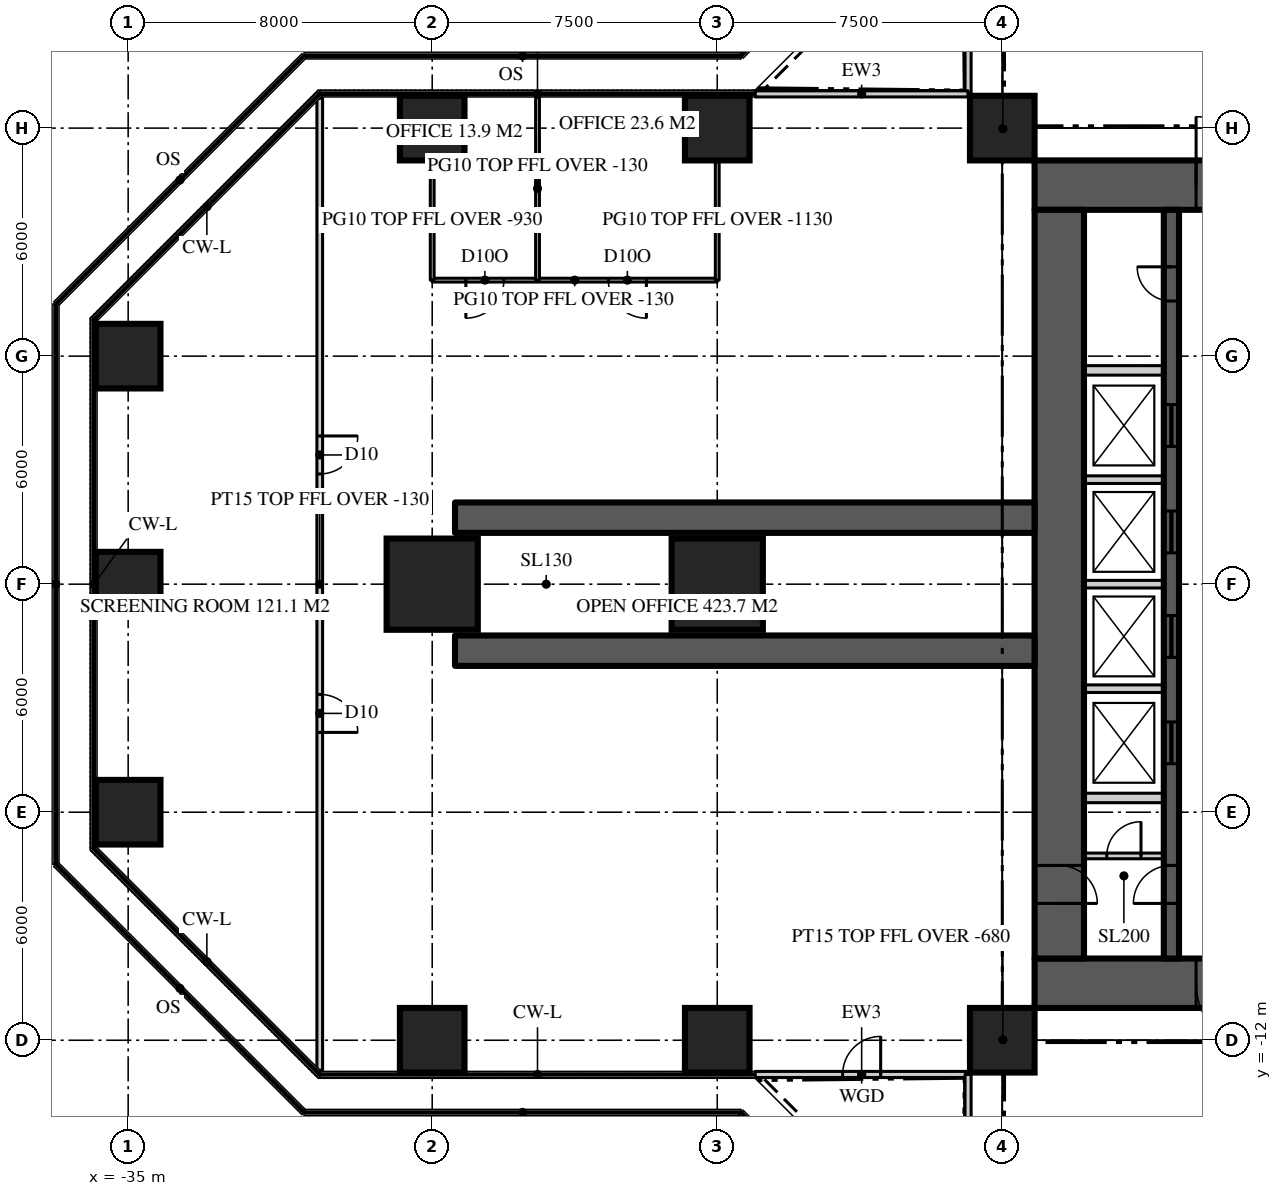
"""IFC4 building model, lengths in metres.
Left out: names, types, materials, properties, quantities, classifications, styles, units other than length and angle.
Written with IfcOpenShell. Run it as: python <this file> out.ifc"""

import sys

from ifc_helpers import new_model, si_unit, direction, frame, frame_2d, origin, origin_2d, place, context, subcontext, project, spatial, rectangle, extrude, element, fill, save


model = new_model("IFC4")
c1 = context("Model", 3, precision=1e-05, world=origin(), true_north=direction((0.0, 1.0)))
c2 = subcontext(c1, "Body", "Model", "MODEL_VIEW")
j1 = project(units=[si_unit("LENGTHUNIT", "METRE"), si_unit("PLANEANGLEUNIT", "RADIAN")], contexts=[c1])
p1 = place(None, origin())
s1 = spatial("IfcSite", under=j1, at=p1, CompositionType="ELEMENT")
p2 = place(p1, origin())
s2 = spatial("IfcBuilding", under=s1, at=p2, CompositionType="ELEMENT")
p3 = place(p2, frame((0.0, 0.0, 82.5)))
s3 = spatial("IfcBuildingStorey", under=s2, at=p3, CompositionType="ELEMENT", Elevation=82.5)
p4 = place(p3, frame((-11.15, 10.5, 0.0), z_axis=(0.0, 0.0, 1.0), x_axis=(1.0, 0.0, 0.0)))
e1 = element("IfcWall", 1, at=p4, inside=s3, PredefinedType="SHEAR", context=c2, shape_type="SweptSolid", body=[
    extrude(rectangle(XDim=22.3, YDim=1.3, at=frame_2d((11.15, 0.0))), origin(), (0.0, 0.0, 1.0), 3.9),
])
p5 = place(p4, frame((4.25, 0.0, 0.0)))
e2 = element("IfcOpeningElement", 2, at=p5, cuts=e1, PredefinedType="OPENING", context=c2, shape_type="SweptSolid", body=[
    extrude(rectangle(XDim=1.8, YDim=2.2, at=frame_2d((0.9, 1.1))), frame((0.0, 0.66, 0.0), z_axis=(0.0, -1.0, 0.0), x_axis=(1.0, 0.0, 0.0)), (0.0, 0.0, 1.0), 1.32),
])
p6 = place(p4, frame((16.25, 0.0, 0.0)))
e3 = element("IfcOpeningElement", 3, at=p6, cuts=e1, PredefinedType="OPENING", context=c2, shape_type="SweptSolid", body=[
    extrude(rectangle(XDim=1.8, YDim=2.2, at=frame_2d((0.9, 1.1))), frame((0.0, 0.66, 0.0), z_axis=(0.0, -1.0, 0.0), x_axis=(1.0, 0.0, 0.0)), (0.0, 0.0, 1.0), 1.32),
])
p7 = place(p3, frame((11.15, -10.5, 0.0), z_axis=(0.0, 0.0, 1.0), x_axis=(-1.0, 0.0, 0.0)))
e4 = element("IfcWall", 4, at=p7, inside=s3, PredefinedType="SHEAR", context=c2, shape_type="SweptSolid", body=[
    extrude(rectangle(XDim=22.3, YDim=1.3, at=frame_2d((11.15, 0.0))), origin(), (0.0, 0.0, 1.0), 3.9),
])
p8 = place(p7, frame((16.25, 0.0, 0.0)))
e5 = element("IfcOpeningElement", 5, at=p8, cuts=e4, PredefinedType="OPENING", context=c2, shape_type="SweptSolid", body=[
    extrude(rectangle(XDim=1.8, YDim=2.2, at=frame_2d((0.9, 1.1))), frame((0.0, 0.66, 0.0), z_axis=(0.0, -1.0, 0.0), x_axis=(1.0, 0.0, 0.0)), (0.0, 0.0, 1.0), 1.32),
])
p9 = place(p7, frame((4.25, 0.0, 0.0)))
e6 = element("IfcOpeningElement", 6, at=p9, cuts=e4, PredefinedType="OPENING", context=c2, shape_type="SweptSolid", body=[
    extrude(rectangle(XDim=1.8, YDim=2.2, at=frame_2d((0.9, 1.1))), frame((0.0, 0.66, 0.0), z_axis=(0.0, -1.0, 0.0), x_axis=(1.0, 0.0, 0.0)), (0.0, 0.0, 1.0), 1.32),
])
p10 = place(p3, frame((-10.5, 9.85, 0.0), z_axis=(0.0, 0.0, 1.0), x_axis=(0.0, -1.0, 0.0)))
e7 = element("IfcWall", 7, at=p10, inside=s3, PredefinedType="SHEAR", context=c2, shape_type="SweptSolid", body=[
    extrude(rectangle(XDim=19.7, YDim=1.3, at=frame_2d((9.85, 0.0))), origin(), (0.0, 0.0, 1.0), 3.9),
])
p11 = place(p10, frame((17.25, 0.0, 0.0)))
e8 = element("IfcOpeningElement", 8, at=p11, cuts=e7, PredefinedType="OPENING", context=c2, shape_type="SweptSolid", body=[
    extrude(rectangle(XDim=1.0, YDim=2.2, at=frame_2d((0.5, 1.1))), frame((0.0, 0.66, 0.0), z_axis=(0.0, -1.0, 0.0), x_axis=(1.0, 0.0, 0.0)), (0.0, 0.0, 1.0), 1.32),
])
for number, where, z_axis, x_axis in (
    (9, (-11.15, 1.75, 0.0), (0.0, 0.0, 1.0), (-1.0, 0.0, 0.0)),
    (10, (-11.15, -1.75, 0.0), (0.0, 0.0, 1.0), (-1.0, 0.0, 0.0)),
):
    element("IfcWall", number, at=place(p3, frame(where, z_axis=z_axis, x_axis=x_axis)), inside=s3, PredefinedType="SHEAR", context=c2, shape_type="SweptSolid", body=[
        extrude(rectangle(XDim=15.25, YDim=0.8, at=frame_2d((7.625, 0.0))), origin(), (0.0, 0.0, 1.0), 3.9),
    ])
for number, where, z_axis, x_axis in (
    (11, (-27.0, -12.0, 0.0), (0.0, 0.0, 1.0), (1.0, 0.0, 0.0)),
    (12, (-19.5, -12.0, 0.0), (0.0, 0.0, 1.0), (1.0, 0.0, 0.0)),
    (13, (-12.0, -12.0, 0.0), (0.0, 0.0, 1.0), (1.0, 0.0, 0.0)),
    (14, (-35.0, -6.0, 0.0), (0.0, 0.0, 1.0), (1.0, 0.0, 0.0)),
    (15, (-35.0, 0.0, 0.0), (0.0, 0.0, 1.0), (1.0, 0.0, 0.0)),
):
    element("IfcColumn", number, at=place(p3, frame(where, z_axis=z_axis, x_axis=x_axis)), inside=s3, PredefinedType="COLUMN", context=c2, shape_type="SweptSolid", body=[
        extrude(rectangle(XDim=1.7, YDim=1.7, at=origin_2d()), origin(), (0.0, 0.0, 1.0), 3.9),
    ])
for number, where, z_axis, x_axis in (
    (16, (-27.0, 0.0, 0.0), (0.0, 0.0, 1.0), (1.0, 0.0, 0.0)),
    (17, (-19.5, 0.0, 0.0), (0.0, 0.0, 1.0), (1.0, 0.0, 0.0)),
):
    element("IfcColumn", number, at=place(p3, frame(where, z_axis=z_axis, x_axis=x_axis)), inside=s3, PredefinedType="COLUMN", context=c2, shape_type="SweptSolid", body=[
        extrude(rectangle(XDim=2.4, YDim=2.4, at=origin_2d()), origin(), (0.0, 0.0, 1.0), 3.9),
    ])
for number, where, z_axis, x_axis in (
    (18, (-35.0, 6.0, 0.0), (0.0, 0.0, 1.0), (1.0, 0.0, 0.0)),
    (19, (-27.0, 12.0, 0.0), (0.0, 0.0, 1.0), (1.0, 0.0, 0.0)),
    (20, (-19.5, 12.0, 0.0), (0.0, 0.0, 1.0), (1.0, 0.0, 0.0)),
    (21, (-12.0, 12.0, 0.0), (0.0, 0.0, 1.0), (1.0, 0.0, 0.0)),
):
    element("IfcColumn", number, at=place(p3, frame(where, z_axis=z_axis, x_axis=x_axis)), inside=s3, PredefinedType="COLUMN", context=c2, shape_type="SweptSolid", body=[
        extrude(rectangle(XDim=1.7, YDim=1.7, at=origin_2d()), origin(), (0.0, 0.0, 1.0), 3.9),
    ])
p12 = place(p3, frame((-12.9, 18.5, 0.0), z_axis=(0.0, 0.0, 1.0), x_axis=(0.0, -1.0, 0.0)))
e22 = element("IfcWall", 22, at=p12, inside=s3, PredefinedType="SOLIDWALL", context=c2, shape_type="SweptSolid", body=[
    extrude(rectangle(XDim=5.6, YDim=0.16, at=frame_2d((2.8, 0.0))), origin(), (0.0, 0.0, 1.0), 3.77),
])
p13 = place(p12, frame((2.3, 0.0, 0.0)))
e23 = element("IfcOpeningElement", 23, at=p13, cuts=e22, PredefinedType="OPENING", context=c2, shape_type="SweptSolid", body=[
    extrude(rectangle(XDim=1.0, YDim=2.2, at=frame_2d((0.5, 1.1))), frame((0.0, 0.09, 0.0), z_axis=(0.0, -1.0, 0.0), x_axis=(1.0, 0.0, 0.0)), (0.0, 0.0, 1.0), 0.18),
])
p14 = place(p3, frame((-12.9, 12.9, 0.0), z_axis=(0.0, 0.0, 1.0), x_axis=(-1.0, 0.0, 0.0)))
e24 = element("IfcWall", 24, at=p14, inside=s3, PredefinedType="SOLIDWALL", context=c2, shape_type="SweptSolid", body=[
    extrude(rectangle(XDim=5.6, YDim=0.16, at=frame_2d((2.8, 0.0))), origin(), (0.0, 0.0, 1.0), 3.77),
])
p15 = place(p3, frame((-18.5, -12.9, 0.0), z_axis=(0.0, 0.0, 1.0), x_axis=(1.0, 0.0, 0.0)))
e25 = element("IfcWall", 25, at=p15, inside=s3, PredefinedType="SOLIDWALL", context=c2, shape_type="SweptSolid", body=[
    extrude(rectangle(XDim=5.6, YDim=0.16, at=frame_2d((2.8, 0.0))), origin(), (0.0, 0.0, 1.0), 3.77),
])
p16 = place(p15, frame((2.3, 0.0, 0.0)))
e26 = element("IfcOpeningElement", 26, at=p16, cuts=e25, PredefinedType="OPENING", context=c2, shape_type="SweptSolid", body=[
    extrude(rectangle(XDim=1.0, YDim=2.2, at=frame_2d((0.5, 1.1))), frame((0.0, 0.09, 0.0), z_axis=(0.0, -1.0, 0.0), x_axis=(1.0, 0.0, 0.0)), (0.0, 0.0, 1.0), 0.18),
])
p17 = place(p3, frame((-12.9, -12.9, 0.0), z_axis=(0.0, 0.0, 1.0), x_axis=(0.0, -1.0, 0.0)))
e27 = element("IfcWall", 27, at=p17, inside=s3, PredefinedType="SOLIDWALL", context=c2, shape_type="SweptSolid", body=[
    extrude(rectangle(XDim=5.6, YDim=0.16, at=frame_2d((2.8, 0.0))), origin(), (0.0, 0.0, 1.0), 3.77),
])
p18 = place(p3, frame((-7.55, -9.85, 0.0), z_axis=(0.0, 0.0, 1.0), x_axis=(0.0, 1.0, 0.0)))
e28 = element("IfcWall", 28, at=p18, inside=s3, PredefinedType="SHEAR", context=c2, shape_type="SweptSolid", body=[
    extrude(rectangle(XDim=19.7, YDim=0.4, at=frame_2d((9.85, 0.0))), origin(), (0.0, 0.0, 1.0), 3.9),
])
p19 = place(p18, frame((1.45, 0.0, 0.0)))
e29 = element("IfcOpeningElement", 29, at=p19, cuts=e28, PredefinedType="OPENING", context=c2, shape_type="SweptSolid", body=[
    extrude(rectangle(XDim=1.0, YDim=2.2, at=frame_2d((0.5, 1.1))), frame((0.0, 0.21, 0.0), z_axis=(0.0, -1.0, 0.0), x_axis=(1.0, 0.0, 0.0)), (0.0, 0.0, 1.0), 0.42),
])
p20 = place(p18, frame((17.3, 0.0, 0.0)))
e30 = element("IfcOpeningElement", 30, at=p20, cuts=e28, PredefinedType="OPENING", context=c2, shape_type="SweptSolid", body=[
    extrude(rectangle(XDim=0.9, YDim=2.1, at=frame_2d((0.45, 1.05))), frame((0.0, 0.21, 0.0), z_axis=(0.0, -1.0, 0.0), x_axis=(1.0, 0.0, 0.0)), (0.0, 0.0, 1.0), 0.42),
])
p21 = place(p18, frame((5.125, 0.0, 0.0)))
e31 = element("IfcOpeningElement", 31, at=p21, cuts=e28, PredefinedType="OPENING", context=c2, shape_type="SweptSolid", body=[
    extrude(rectangle(XDim=1.1, YDim=2.2, at=frame_2d((0.55, 1.1))), frame((0.0, 0.21, 0.0), z_axis=(0.0, -1.0, 0.0), x_axis=(1.0, 0.0, 0.0)), (0.0, 0.0, 1.0), 0.42),
])
p22 = place(p18, frame((7.925, 0.0, 0.0)))
e32 = element("IfcOpeningElement", 32, at=p22, cuts=e28, PredefinedType="OPENING", context=c2, shape_type="SweptSolid", body=[
    extrude(rectangle(XDim=1.1, YDim=2.2, at=frame_2d((0.55, 1.1))), frame((0.0, 0.21, 0.0), z_axis=(0.0, -1.0, 0.0), x_axis=(1.0, 0.0, 0.0)), (0.0, 0.0, 1.0), 0.42),
])
p23 = place(p18, frame((10.675, 0.0, 0.0)))
e33 = element("IfcOpeningElement", 33, at=p23, cuts=e28, PredefinedType="OPENING", context=c2, shape_type="SweptSolid", body=[
    extrude(rectangle(XDim=1.1, YDim=2.2, at=frame_2d((0.55, 1.1))), frame((0.0, 0.21, 0.0), z_axis=(0.0, -1.0, 0.0), x_axis=(1.0, 0.0, 0.0)), (0.0, 0.0, 1.0), 0.42),
])
p24 = place(p18, frame((13.475, 0.0, 0.0)))
e34 = element("IfcOpeningElement", 34, at=p24, cuts=e28, PredefinedType="OPENING", context=c2, shape_type="SweptSolid", body=[
    extrude(rectangle(XDim=1.1, YDim=2.2, at=frame_2d((0.55, 1.1))), frame((0.0, 0.21, 0.0), z_axis=(0.0, -1.0, 0.0), x_axis=(1.0, 0.0, 0.0)), (0.0, 0.0, 1.0), 0.42),
])
for number, where, z_axis, x_axis in (
    (35, (-9.85, 5.625, 0.0), (0.0, 0.0, 1.0), (1.0, 0.0, 0.0)),
    (36, (-9.85, -5.625, 0.0), (0.0, 0.0, 1.0), (1.0, 0.0, 0.0)),
):
    element("IfcWall", number, at=place(p3, frame(where, z_axis=z_axis, x_axis=x_axis)), inside=s3, PredefinedType="SOLIDWALL", context=c2, shape_type="SweptSolid", body=[
        extrude(rectangle(XDim=2.1, YDim=0.25, at=frame_2d((1.05, 0.0))), origin(), (0.0, 0.0, 1.0), 3.7),
    ])
for number, where, z_axis, x_axis in (
    (37, (-9.85, -2.75, 0.0), (0.0, 0.0, 1.0), (1.0, 0.0, 0.0)),
    (38, (-9.85, 0.0, 0.0), (0.0, 0.0, 1.0), (1.0, 0.0, 0.0)),
    (39, (-9.85, 2.75, 0.0), (0.0, 0.0, 1.0), (1.0, 0.0, 0.0)),
):
    element("IfcWall", number, at=place(p3, frame(where, z_axis=z_axis, x_axis=x_axis)), inside=s3, PredefinedType="SOLIDWALL", context=c2, shape_type="SweptSolid", body=[
        extrude(rectangle(XDim=2.1, YDim=0.2, at=frame_2d((1.05, 0.0))), origin(), (0.0, 0.0, 1.0), 3.7),
    ])
p25 = place(p3, frame((-29.959, 12.786, 0.0), z_axis=(0.0, 0.0, 1.0), x_axis=(0.0, -1.0, 0.0)))
e40 = element("IfcWall", 40, at=p25, inside=s3, PredefinedType="PARTITIONING", context=c2, shape_type="SweptSolid", body=[
    extrude(rectangle(XDim=25.573, YDim=0.15, at=frame_2d((12.786, 0.0))), origin(), (0.0, 0.0, 1.0), 3.77),
])
p26 = place(p25, frame((15.687, 0.0, 0.0)))
e41 = element("IfcOpeningElement", 41, at=p26, cuts=e40, PredefinedType="OPENING", context=c2, shape_type="SweptSolid", body=[
    extrude(rectangle(XDim=1.0, YDim=2.2, at=frame_2d((0.5, 1.1))), frame((0.0, 0.085, 0.0), z_axis=(0.0, -1.0, 0.0), x_axis=(1.0, 0.0, 0.0)), (0.0, 0.0, 1.0), 0.17),
])
p27 = place(p25, frame((8.886, 0.0, 0.0)))
e42 = element("IfcOpeningElement", 42, at=p27, cuts=e40, PredefinedType="OPENING", context=c2, shape_type="SweptSolid", body=[
    extrude(rectangle(XDim=1.0, YDim=2.2, at=frame_2d((0.5, 1.1))), frame((0.0, 0.085, 0.0), z_axis=(0.0, -1.0, 0.0), x_axis=(1.0, 0.0, 0.0)), (0.0, 0.0, 1.0), 0.17),
])
p28 = place(p3, frame((-19.5, 8.0, 0.0), z_axis=(0.0, 0.0, 1.0), x_axis=(-1.0, 0.0, 0.0)))
e43 = element("IfcWall", 43, at=p28, inside=s3, PredefinedType="PARTITIONING", context=c2, shape_type="SweptSolid", body=[
    extrude(rectangle(XDim=7.5, YDim=0.1, at=frame_2d((3.75, 0.0))), origin(), (0.0, 0.0, 1.0), 3.77),
])
p29 = place(p28, frame((1.865, 0.0, 0.0)))
e44 = element("IfcOpeningElement", 44, at=p29, cuts=e43, PredefinedType="OPENING", context=c2, shape_type="SweptSolid", body=[
    extrude(rectangle(XDim=1.0, YDim=2.2, at=frame_2d((0.5, 1.1))), frame((0.0, 0.06, 0.0), z_axis=(0.0, -1.0, 0.0), x_axis=(1.0, 0.0, 0.0)), (0.0, 0.0, 1.0), 0.12),
])
p30 = place(p28, frame((5.615, 0.0, 0.0)))
e45 = element("IfcOpeningElement", 45, at=p30, cuts=e43, PredefinedType="OPENING", context=c2, shape_type="SweptSolid", body=[
    extrude(rectangle(XDim=1.0, YDim=2.2, at=frame_2d((0.5, 1.1))), frame((0.0, 0.06, 0.0), z_axis=(0.0, -1.0, 0.0), x_axis=(1.0, 0.0, 0.0)), (0.0, 0.0, 1.0), 0.12),
])
p31 = place(p3, frame((-19.5, 8.0, 0.0), z_axis=(0.0, 0.0, 1.0), x_axis=(0.0, 1.0, 0.0)))
e46 = element("IfcWall", 46, at=p31, inside=s3, PredefinedType="PARTITIONING", context=c2, shape_type="SweptSolid", body=[
    extrude(rectangle(XDim=3.15, YDim=0.1, at=frame_2d((1.575, 0.0))), origin(), (0.0, 0.0, 1.0), 2.77),
])
p32 = place(p3, frame((-24.229, 8.0, 0.0), z_axis=(0.0, 0.0, 1.0), x_axis=(0.0, 1.0, 0.0)))
e47 = element("IfcWall", 47, at=p32, inside=s3, PredefinedType="PARTITIONING", context=c2, shape_type="SweptSolid", body=[
    extrude(rectangle(XDim=4.82, YDim=0.1, at=frame_2d((2.41, 0.0))), origin(), (0.0, 0.0, 1.0), 3.77),
])
p33 = place(p3, frame((-27.0, 8.0, 0.0), z_axis=(0.0, 0.0, 1.0), x_axis=(0.0, 1.0, 0.0)))
e48 = element("IfcWall", 48, at=p33, inside=s3, PredefinedType="PARTITIONING", context=c2, shape_type="SweptSolid", body=[
    extrude(rectangle(XDim=3.15, YDim=0.1, at=frame_2d((1.575, 0.0))), origin(), (0.0, 0.0, 1.0), 2.97),
])
for number, where, z_axis, x_axis in (
    (49, (-11.15, 11.15, 0.0), (0.0, 0.0, 1.0), (-0.707, 0.707, 0.0)),
    (50, (-11.15, -11.15, 0.0), (0.0, 0.0, 1.0), (-0.707, -0.707, 0.0)),
):
    element("IfcWall", number, at=place(p3, frame(where, z_axis=z_axis, x_axis=x_axis)), inside=s3, PredefinedType="PARTITIONING", context=c2, shape_type="SweptSolid", body=[
        extrude(rectangle(XDim=2.362, YDim=0.15, at=frame_2d((1.181, 0.0))), origin(), (0.0, 0.0, 1.0), 3.22),
    ])
p34 = place(p3, frame((-9.85, -7.15, 0.0), z_axis=(0.0, 0.0, 1.0), x_axis=(1.0, 0.0, 0.0)))
e51 = element("IfcWall", 51, at=p34, inside=s3, PredefinedType="SOLIDWALL", context=c2, shape_type="SweptSolid", body=[
    extrude(rectangle(XDim=2.1, YDim=0.15, at=frame_2d((1.05, 0.0))), origin(), (0.0, 0.0, 1.0), 3.77),
])
p35 = place(p34, frame((0.6, 0.0, 0.0)))
e52 = element("IfcOpeningElement", 52, at=p35, cuts=e51, PredefinedType="OPENING", context=c2, shape_type="SweptSolid", body=[
    extrude(rectangle(XDim=0.9, YDim=2.1, at=frame_2d((0.45, 1.05))), frame((0.0, 0.085, 0.0), z_axis=(0.0, -1.0, 0.0), x_axis=(1.0, 0.0, 0.0)), (0.0, 0.0, 1.0), 0.17),
])
p36 = place(p16, origin())
e53 = element("IfcDoor", 53, at=p36, inside=s3, OperationType="SINGLE_SWING_RIGHT", PredefinedType="DOOR", context=c2, shape_type="SweptSolid", body=[
    extrude(rectangle(XDim=1.0, YDim=2.2, at=frame_2d((0.5, 1.1))), frame((0.0, 0.025, 0.0), z_axis=(0.0, -1.0, 0.0), x_axis=(1.0, 0.0, 0.0)), (0.0, 0.0, 1.0), 0.05),
])
fill(e26, e53)
p37 = place(p5, origin())
e54 = element("IfcDoor", 54, at=p37, inside=s3, OperationType="DOUBLE_DOOR_DOUBLE_SWING", PredefinedType="DOOR", context=c2, shape_type="SweptSolid", body=[
    extrude(rectangle(XDim=1.8, YDim=2.2, at=frame_2d((0.9, 1.1))), frame((0.0, 0.025, 0.0), z_axis=(0.0, -1.0, 0.0), x_axis=(1.0, 0.0, 0.0)), (0.0, 0.0, 1.0), 0.05),
])
fill(e2, e54)
p38 = place(p8, origin())
e55 = element("IfcDoor", 55, at=p38, inside=s3, OperationType="DOUBLE_DOOR_DOUBLE_SWING", PredefinedType="DOOR", context=c2, shape_type="SweptSolid", body=[
    extrude(rectangle(XDim=1.8, YDim=2.2, at=frame_2d((0.9, 1.1))), frame((0.0, 0.025, 0.0), z_axis=(0.0, -1.0, 0.0), x_axis=(1.0, 0.0, 0.0)), (0.0, 0.0, 1.0), 0.05),
])
fill(e5, e55)
p39 = place(p19, origin())
e56 = element("IfcDoor", 56, at=p39, inside=s3, OperationType="SINGLE_SWING_LEFT", PredefinedType="DOOR", context=c2, shape_type="SweptSolid", body=[
    extrude(rectangle(XDim=1.0, YDim=2.2, at=frame_2d((0.5, 1.1))), frame((0.0, 0.025, 0.0), z_axis=(0.0, -1.0, 0.0), x_axis=(1.0, 0.0, 0.0)), (0.0, 0.0, 1.0), 0.05),
])
fill(e29, e56)
p40 = place(p11, origin())
e57 = element("IfcDoor", 57, at=p40, inside=s3, OperationType="SINGLE_SWING_RIGHT", PredefinedType="DOOR", context=c2, shape_type="SweptSolid", body=[
    extrude(rectangle(XDim=1.0, YDim=2.2, at=frame_2d((0.5, 1.1))), frame((0.0, 0.025, 0.0), z_axis=(0.0, -1.0, 0.0), x_axis=(1.0, 0.0, 0.0)), (0.0, 0.0, 1.0), 0.05),
])
fill(e8, e57)
p41 = place(p20, origin())
e58 = element("IfcDoor", 58, at=p41, inside=s3, OperationType="SINGLE_SWING_RIGHT", PredefinedType="DOOR", context=c2, shape_type="SweptSolid", body=[
    extrude(rectangle(XDim=0.9, YDim=2.1, at=frame_2d((0.45, 1.05))), frame((0.0, 0.025, 0.0), z_axis=(0.0, -1.0, 0.0), x_axis=(1.0, 0.0, 0.0)), (0.0, 0.0, 1.0), 0.05),
])
fill(e30, e58)
p42 = place(p21, origin())
e59 = element("IfcDoor", 59, at=p42, inside=s3, OperationType="SLIDING_TO_LEFT", PredefinedType="DOOR", context=c2, shape_type="SweptSolid", body=[
    extrude(rectangle(XDim=1.1, YDim=2.2, at=frame_2d((0.55, 1.1))), frame((0.0, 0.025, 0.0), z_axis=(0.0, -1.0, 0.0), x_axis=(1.0, 0.0, 0.0)), (0.0, 0.0, 1.0), 0.05),
])
fill(e31, e59)
p43 = place(p22, origin())
e60 = element("IfcDoor", 60, at=p43, inside=s3, OperationType="SLIDING_TO_LEFT", PredefinedType="DOOR", context=c2, shape_type="SweptSolid", body=[
    extrude(rectangle(XDim=1.1, YDim=2.2, at=frame_2d((0.55, 1.1))), frame((0.0, 0.025, 0.0), z_axis=(0.0, -1.0, 0.0), x_axis=(1.0, 0.0, 0.0)), (0.0, 0.0, 1.0), 0.05),
])
fill(e32, e60)
p44 = place(p23, origin())
e61 = element("IfcDoor", 61, at=p44, inside=s3, OperationType="SLIDING_TO_LEFT", PredefinedType="DOOR", context=c2, shape_type="SweptSolid", body=[
    extrude(rectangle(XDim=1.1, YDim=2.2, at=frame_2d((0.55, 1.1))), frame((0.0, 0.025, 0.0), z_axis=(0.0, -1.0, 0.0), x_axis=(1.0, 0.0, 0.0)), (0.0, 0.0, 1.0), 0.05),
])
fill(e33, e61)
p45 = place(p24, origin())
e62 = element("IfcDoor", 62, at=p45, inside=s3, OperationType="SLIDING_TO_LEFT", PredefinedType="DOOR", context=c2, shape_type="SweptSolid", body=[
    extrude(rectangle(XDim=1.1, YDim=2.2, at=frame_2d((0.55, 1.1))), frame((0.0, 0.025, 0.0), z_axis=(0.0, -1.0, 0.0), x_axis=(1.0, 0.0, 0.0)), (0.0, 0.0, 1.0), 0.05),
])
fill(e34, e62)
p46 = place(p26, origin())
e63 = element("IfcDoor", 63, at=p46, inside=s3, OperationType="SINGLE_SWING_RIGHT", PredefinedType="DOOR", context=c2, shape_type="SweptSolid", body=[
    extrude(rectangle(XDim=1.0, YDim=2.2, at=frame_2d((0.5, 1.1))), frame((0.0, 0.025, 0.0), z_axis=(0.0, -1.0, 0.0), x_axis=(1.0, 0.0, 0.0)), (0.0, 0.0, 1.0), 0.05),
])
fill(e41, e63)
p47 = place(p27, origin())
e64 = element("IfcDoor", 64, at=p47, inside=s3, OperationType="SINGLE_SWING_LEFT", PredefinedType="DOOR", context=c2, shape_type="SweptSolid", body=[
    extrude(rectangle(XDim=1.0, YDim=2.2, at=frame_2d((0.5, 1.1))), frame((0.0, 0.025, 0.0), z_axis=(0.0, -1.0, 0.0), x_axis=(1.0, 0.0, 0.0)), (0.0, 0.0, 1.0), 0.05),
])
fill(e42, e64)
p48 = place(p29, origin())
e65 = element("IfcDoor", 65, at=p48, inside=s3, OperationType="SINGLE_SWING_LEFT", PredefinedType="DOOR", context=c2, shape_type="SweptSolid", body=[
    extrude(rectangle(XDim=1.0, YDim=2.2, at=frame_2d((0.5, 1.1))), frame((0.0, 0.025, 0.0), z_axis=(0.0, -1.0, 0.0), x_axis=(1.0, 0.0, 0.0)), (0.0, 0.0, 1.0), 0.05),
])
fill(e44, e65)
p49 = place(p30, origin())
e66 = element("IfcDoor", 66, at=p49, inside=s3, OperationType="SINGLE_SWING_RIGHT", PredefinedType="DOOR", context=c2, shape_type="SweptSolid", body=[
    extrude(rectangle(XDim=1.0, YDim=2.2, at=frame_2d((0.5, 1.1))), frame((0.0, 0.025, 0.0), z_axis=(0.0, -1.0, 0.0), x_axis=(1.0, 0.0, 0.0)), (0.0, 0.0, 1.0), 0.05),
])
fill(e45, e66)
p50 = place(p35, origin())
e67 = element("IfcDoor", 67, at=p50, inside=s3, OperationType="SINGLE_SWING_RIGHT", PredefinedType="DOOR", context=c2, shape_type="SweptSolid", body=[
    extrude(rectangle(XDim=0.9, YDim=2.1, at=frame_2d((0.45, 1.05))), frame((0.0, 0.025, 0.0), z_axis=(0.0, -1.0, 0.0), x_axis=(1.0, 0.0, 0.0)), (0.0, 0.0, 1.0), 0.05),
])
fill(e52, e67)
save(model, sys.argv[1])
